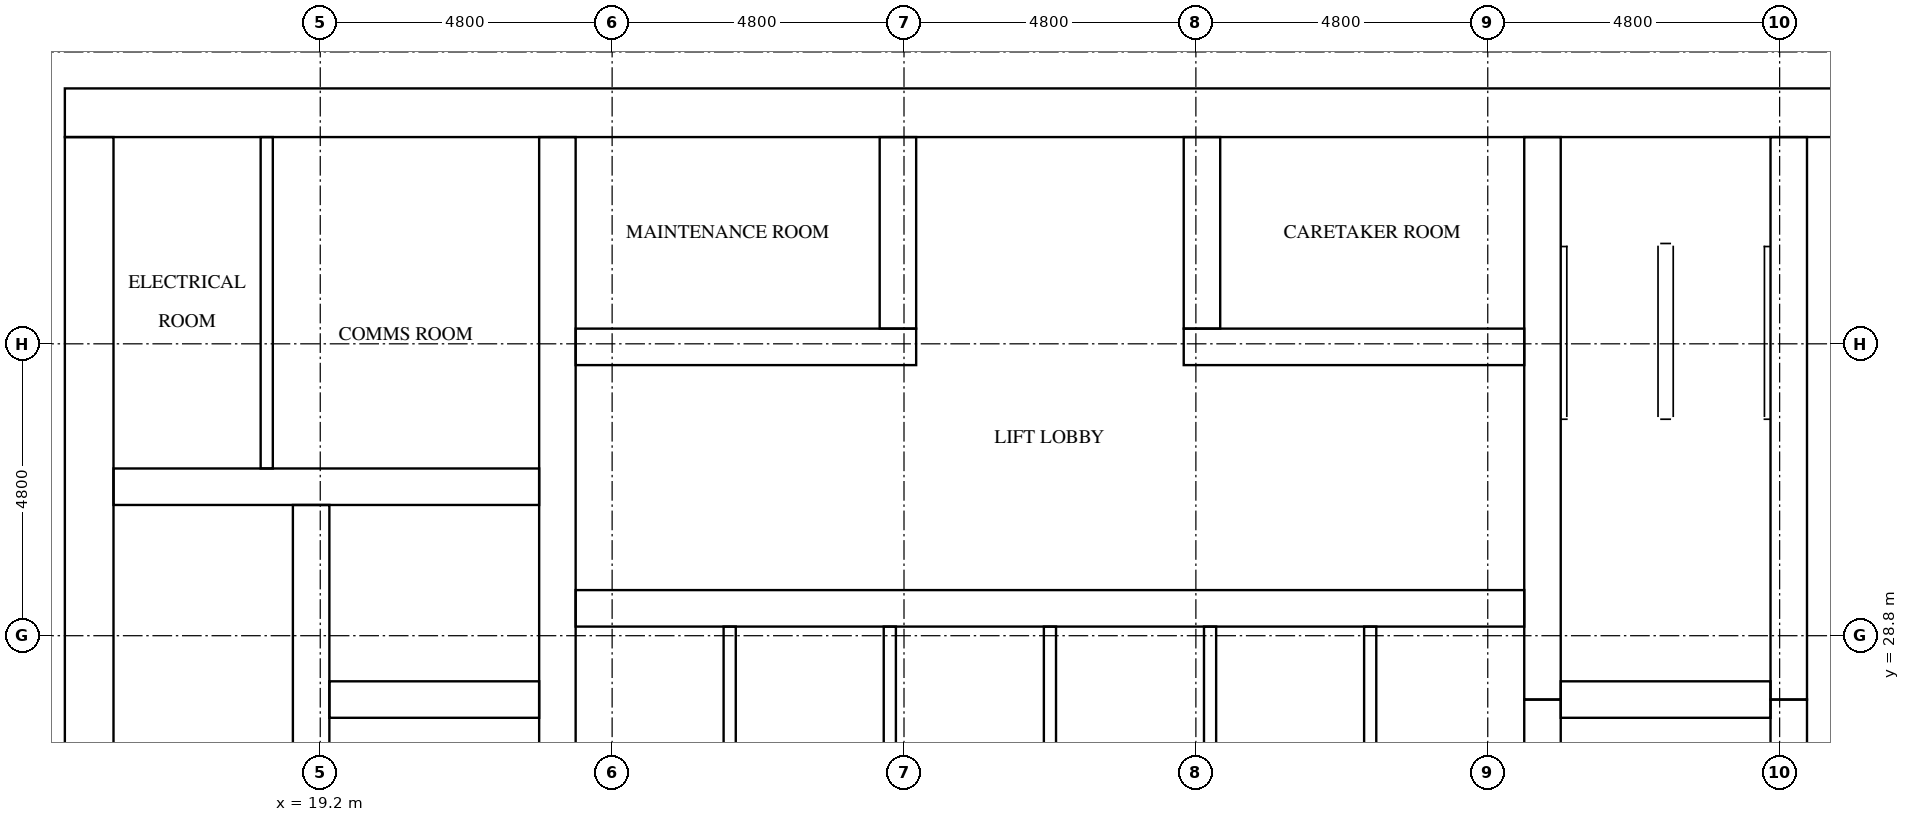
"""IFC4 building model, lengths in metres.
Left out: names, types, materials, properties, quantities, classifications, styles, units other than length and angle.
Written with IfcOpenShell. Run it as: python <this file> out.ifc"""

import sys

from ifc_helpers import new_model, si_unit, direction, frame, frame_2d, origin, place, context, subcontext, project, spatial, rectangle, extrude, element, fill, save


model = new_model("IFC4")
c1 = context("Model", 3, precision=1e-05, world=origin(), true_north=direction((0.0, 1.0)))
c2 = subcontext(c1, "Body", "Model", "MODEL_VIEW")
j1 = project(units=[si_unit("LENGTHUNIT", "METRE"), si_unit("PLANEANGLEUNIT", "RADIAN")], contexts=[c1])
p1 = place(None, origin())
s1 = spatial("IfcSite", under=j1, at=p1, CompositionType="ELEMENT")
p2 = place(p1, origin())
s2 = spatial("IfcBuilding", under=s1, at=p2, CompositionType="ELEMENT")
p3 = place(p2, frame((0.0, 0.0, 152.5)))
s3 = spatial("IfcBuildingStorey", under=s2, at=p3, CompositionType="ELEMENT", Elevation=152.5)
p4 = place(p3, frame((15.0, 37.4, 0.0), z_axis=(0.0, 0.0, 1.0), x_axis=(1.0, 0.0, 0.0)))
e1 = element("IfcWall", 1, at=p4, inside=s3, PredefinedType="SHEAR", context=c2, shape_type="SweptSolid", body=[
    extrude(rectangle(XDim=32.4, YDim=0.8, at=frame_2d((16.2, 0.0))), origin(), (0.0, 0.0, 1.0), 3.2),
])
p5 = place(p4, frame((15.3, 0.0, 0.0)))
e2 = element("IfcOpeningElement", 2, at=p5, cuts=e1, PredefinedType="OPENING", context=c2, shape_type="SweptSolid", body=[
    extrude(rectangle(XDim=1.8, YDim=2.1, at=frame_2d((0.9, 1.05))), frame((0.0, 0.41, 0.0), z_axis=(0.0, -1.0, 0.0), x_axis=(1.0, 0.0, 0.0)), (0.0, 0.0, 1.0), 0.82),
])
p6 = place(p4, frame((1.51, 0.0, 0.0)))
e3 = element("IfcOpeningElement", 3, at=p6, cuts=e1, PredefinedType="OPENING", context=c2, shape_type="SweptSolid", body=[
    extrude(rectangle(XDim=1.0, YDim=2.1, at=frame_2d((0.5, 1.05))), frame((0.0, 0.41, 0.0), z_axis=(0.0, -1.0, 0.0), x_axis=(1.0, 0.0, 0.0)), (0.0, 0.0, 1.0), 0.82),
])
p7 = place(p4, frame((5.11, 0.0, 0.0)))
e4 = element("IfcOpeningElement", 4, at=p7, cuts=e1, PredefinedType="OPENING", context=c2, shape_type="SweptSolid", body=[
    extrude(rectangle(XDim=1.0, YDim=2.1, at=frame_2d((0.5, 1.05))), frame((0.0, 0.41, 0.0), z_axis=(0.0, -1.0, 0.0), x_axis=(1.0, 0.0, 0.0)), (0.0, 0.0, 1.0), 0.82),
])
p8 = place(p3, frame((15.4, 15.8, 0.0), z_axis=(0.0, 0.0, 1.0), x_axis=(0.0, 1.0, 0.0)))
e5 = element("IfcWall", 5, at=p8, inside=s3, PredefinedType="SHEAR", context=c2, shape_type="SweptSolid", body=[
    extrude(rectangle(XDim=21.2, YDim=0.8, at=frame_2d((10.6, 0.0))), origin(), (0.0, 0.0, 1.0), 3.2),
])
p9 = place(p8, frame((4.96, 0.0, 0.0)))
e6 = element("IfcOpeningElement", 6, at=p9, cuts=e5, PredefinedType="OPENING", context=c2, shape_type="SweptSolid", body=[
    extrude(rectangle(XDim=1.2, YDim=2.1, at=frame_2d((0.6, 1.05))), frame((0.0, 0.41, 0.0), z_axis=(0.0, -1.0, 0.0), x_axis=(1.0, 0.0, 0.0)), (0.0, 0.0, 1.0), 0.82),
])
p10 = place(p3, frame((19.05, 15.8, 0.0), z_axis=(0.0, 0.0, 1.0), x_axis=(0.0, 1.0, 0.0)))
e7 = element("IfcWall", 7, at=p10, inside=s3, PredefinedType="SHEAR", context=c2, shape_type="SweptSolid", body=[
    extrude(rectangle(XDim=15.15, YDim=0.6, at=frame_2d((7.575, 0.0))), origin(), (0.0, 0.0, 1.0), 3.2),
])
p11 = place(p10, frame((9.65, 0.0, 0.0)))
e8 = element("IfcOpeningElement", 8, at=p11, cuts=e7, PredefinedType="OPENING", context=c2, shape_type="SweptSolid", body=[
    extrude(rectangle(XDim=1.1, YDim=2.1, at=frame_2d((0.55, 1.05))), frame((0.0, 0.31, 0.0), z_axis=(0.0, -1.0, 0.0), x_axis=(1.0, 0.0, 0.0)), (0.0, 0.0, 1.0), 0.62),
])
p12 = place(p10, frame((13.15, 0.0, 0.0)))
e9 = element("IfcOpeningElement", 9, at=p12, cuts=e7, PredefinedType="OPENING", context=c2, shape_type="SweptSolid", body=[
    extrude(rectangle(XDim=1.1, YDim=2.1, at=frame_2d((0.55, 1.05))), frame((0.0, 0.31, 0.0), z_axis=(0.0, -1.0, 0.0), x_axis=(1.0, 0.0, 0.0)), (0.0, 0.0, 1.0), 0.62),
])
p13 = place(p10, frame((0.4, 0.0, 0.0)))
e10 = element("IfcOpeningElement", 10, at=p13, cuts=e7, PredefinedType="OPENING", context=c2, shape_type="SweptSolid", body=[
    extrude(rectangle(XDim=1.2, YDim=2.1, at=frame_2d((0.6, 1.05))), frame((0.0, 0.31, 0.0), z_axis=(0.0, -1.0, 0.0), x_axis=(1.0, 0.0, 0.0)), (0.0, 0.0, 1.0), 0.62),
])
p14 = place(p3, frame((23.1, 15.8, 0.0), z_axis=(0.0, 0.0, 1.0), x_axis=(0.0, 1.0, 0.0)))
e11 = element("IfcWall", 11, at=p14, inside=s3, PredefinedType="SHEAR", context=c2, shape_type="SweptSolid", body=[
    extrude(rectangle(XDim=21.2, YDim=0.6, at=frame_2d((10.6, 0.0))), origin(), (0.0, 0.0, 1.0), 3.2),
])
p15 = place(p3, frame((39.3, 24.25, 0.0), z_axis=(0.0, 0.0, 1.0), x_axis=(0.0, 1.0, 0.0)))
e12 = element("IfcWall", 12, at=p15, inside=s3, PredefinedType="SHEAR", context=c2, shape_type="SweptSolid", body=[
    extrude(rectangle(XDim=3.5, YDim=0.6, at=frame_2d((1.75, 0.0))), origin(), (0.0, 0.0, 1.0), 3.2),
])
p16 = place(p3, frame((39.3, 27.75, 0.0), z_axis=(0.0, 0.0, 1.0), x_axis=(0.0, 1.0, 0.0)))
e13 = element("IfcWall", 13, at=p16, inside=s3, PredefinedType="SHEAR", context=c2, shape_type="SweptSolid", body=[
    extrude(rectangle(XDim=9.25, YDim=0.6, at=frame_2d((4.625, 0.0))), origin(), (0.0, 0.0, 1.0), 3.2),
])
p17 = place(p3, frame((43.35, 24.25, 0.0), z_axis=(0.0, 0.0, 1.0), x_axis=(0.0, 1.0, 0.0)))
e14 = element("IfcWall", 14, at=p17, inside=s3, PredefinedType="SHEAR", context=c2, shape_type="SweptSolid", body=[
    extrude(rectangle(XDim=3.5, YDim=0.6, at=frame_2d((1.75, 0.0))), origin(), (0.0, 0.0, 1.0), 3.2),
])
p18 = place(p17, frame((1.2, 0.0, 0.0)))
e15 = element("IfcOpeningElement", 15, at=p18, cuts=e14, PredefinedType="OPENING", context=c2, shape_type="SweptSolid", body=[
    extrude(rectangle(XDim=1.1, YDim=2.1, at=frame_2d((0.55, 1.05))), frame((0.0, 0.31, 0.0), z_axis=(0.0, -1.0, 0.0), x_axis=(1.0, 0.0, 0.0)), (0.0, 0.0, 1.0), 0.62),
])
p19 = place(p3, frame((43.35, 27.75, 0.0), z_axis=(0.0, 0.0, 1.0), x_axis=(0.0, 1.0, 0.0)))
e16 = element("IfcWall", 16, at=p19, inside=s3, PredefinedType="SHEAR", context=c2, shape_type="SweptSolid", body=[
    extrude(rectangle(XDim=9.25, YDim=0.6, at=frame_2d((4.625, 0.0))), origin(), (0.0, 0.0, 1.0), 3.2),
])
p20 = place(p19, frame((7.65, 0.0, 0.0)))
e17 = element("IfcOpeningElement", 17, at=p20, cuts=e16, PredefinedType="OPENING", context=c2, shape_type="SweptSolid", body=[
    extrude(rectangle(XDim=1.2, YDim=2.1, at=frame_2d((0.6, 1.05))), frame((0.0, 0.31, 0.0), z_axis=(0.0, -1.0, 0.0), x_axis=(1.0, 0.0, 0.0)), (0.0, 0.0, 1.0), 0.62),
])
p21 = place(p3, frame((19.35, 27.75, 0.0), z_axis=(0.0, 0.0, 1.0), x_axis=(1.0, 0.0, 0.0)))
e18 = element("IfcWall", 18, at=p21, inside=s3, PredefinedType="SHEAR", context=c2, shape_type="SweptSolid", body=[
    extrude(rectangle(XDim=3.45, YDim=0.6, at=frame_2d((1.725, 0.0))), origin(), (0.0, 0.0, 1.0), 3.2),
])
p22 = place(p3, frame((15.8, 31.25, 0.0), z_axis=(0.0, 0.0, 1.0), x_axis=(1.0, 0.0, 0.0)))
e19 = element("IfcWall", 19, at=p22, inside=s3, PredefinedType="SHEAR", context=c2, shape_type="SweptSolid", body=[
    extrude(rectangle(XDim=7.0, YDim=0.6, at=frame_2d((3.5, 0.0))), origin(), (0.0, 0.0, 1.0), 3.2),
])
p23 = place(p3, frame((39.6, 27.75, 0.0), z_axis=(0.0, 0.0, 1.0), x_axis=(1.0, 0.0, 0.0)))
e20 = element("IfcWall", 20, at=p23, inside=s3, PredefinedType="SHEAR", context=c2, shape_type="SweptSolid", body=[
    extrude(rectangle(XDim=3.45, YDim=0.6, at=frame_2d((1.725, 0.0))), origin(), (0.0, 0.0, 1.0), 3.2),
])
p24 = place(p3, frame((23.4, 29.25, 0.0), z_axis=(0.0, 0.0, 1.0), x_axis=(1.0, 0.0, 0.0)))
e21 = element("IfcWall", 21, at=p24, inside=s3, PredefinedType="SHEAR", context=c2, shape_type="SweptSolid", body=[
    extrude(rectangle(XDim=15.6, YDim=0.6, at=frame_2d((7.8, 0.0))), origin(), (0.0, 0.0, 1.0), 3.2),
])
p25 = place(p24, frame((0.667, 0.0, 0.0)))
e22 = element("IfcOpeningElement", 22, at=p25, cuts=e21, PredefinedType="OPENING", context=c2, shape_type="SweptSolid", body=[
    extrude(rectangle(XDim=1.1, YDim=2.1, at=frame_2d((0.55, 1.05))), frame((0.0, 0.31, 0.0), z_axis=(0.0, -1.0, 0.0), x_axis=(1.0, 0.0, 0.0)), (0.0, 0.0, 1.0), 0.62),
])
p26 = place(p24, frame((3.3, 0.0, 0.0)))
e23 = element("IfcOpeningElement", 23, at=p26, cuts=e21, PredefinedType="OPENING", context=c2, shape_type="SweptSolid", body=[
    extrude(rectangle(XDim=1.1, YDim=2.1, at=frame_2d((0.55, 1.05))), frame((0.0, 0.31, 0.0), z_axis=(0.0, -1.0, 0.0), x_axis=(1.0, 0.0, 0.0)), (0.0, 0.0, 1.0), 0.62),
])
p27 = place(p24, frame((5.933, 0.0, 0.0)))
e24 = element("IfcOpeningElement", 24, at=p27, cuts=e21, PredefinedType="OPENING", context=c2, shape_type="SweptSolid", body=[
    extrude(rectangle(XDim=1.1, YDim=2.1, at=frame_2d((0.55, 1.05))), frame((0.0, 0.31, 0.0), z_axis=(0.0, -1.0, 0.0), x_axis=(1.0, 0.0, 0.0)), (0.0, 0.0, 1.0), 0.62),
])
p28 = place(p24, frame((8.567, 0.0, 0.0)))
e25 = element("IfcOpeningElement", 25, at=p28, cuts=e21, PredefinedType="OPENING", context=c2, shape_type="SweptSolid", body=[
    extrude(rectangle(XDim=1.1, YDim=2.1, at=frame_2d((0.55, 1.05))), frame((0.0, 0.31, 0.0), z_axis=(0.0, -1.0, 0.0), x_axis=(1.0, 0.0, 0.0)), (0.0, 0.0, 1.0), 0.62),
])
p29 = place(p24, frame((11.2, 0.0, 0.0)))
e26 = element("IfcOpeningElement", 26, at=p29, cuts=e21, PredefinedType="OPENING", context=c2, shape_type="SweptSolid", body=[
    extrude(rectangle(XDim=1.1, YDim=2.1, at=frame_2d((0.55, 1.05))), frame((0.0, 0.31, 0.0), z_axis=(0.0, -1.0, 0.0), x_axis=(1.0, 0.0, 0.0)), (0.0, 0.0, 1.0), 0.62),
])
p30 = place(p24, frame((13.833, 0.0, 0.0)))
e27 = element("IfcOpeningElement", 27, at=p30, cuts=e21, PredefinedType="OPENING", context=c2, shape_type="SweptSolid", body=[
    extrude(rectangle(XDim=1.1, YDim=2.1, at=frame_2d((0.55, 1.05))), frame((0.0, 0.31, 0.0), z_axis=(0.0, -1.0, 0.0), x_axis=(1.0, 0.0, 0.0)), (0.0, 0.0, 1.0), 0.62),
])
p31 = place(p3, frame((23.4, 33.55, 0.0), z_axis=(0.0, 0.0, 1.0), x_axis=(1.0, 0.0, 0.0)))
e28 = element("IfcWall", 28, at=p31, inside=s3, PredefinedType="SHEAR", context=c2, shape_type="SweptSolid", body=[
    extrude(rectangle(XDim=5.6, YDim=0.6, at=frame_2d((2.8, 0.0))), origin(), (0.0, 0.0, 1.0), 3.2),
])
p32 = place(p31, frame((2.0, 0.0, 0.0)))
e29 = element("IfcOpeningElement", 29, at=p32, cuts=e28, PredefinedType="OPENING", context=c2, shape_type="SweptSolid", body=[
    extrude(rectangle(XDim=1.0, YDim=2.1, at=frame_2d((0.5, 1.05))), frame((0.0, 0.31, 0.0), z_axis=(0.0, -1.0, 0.0), x_axis=(1.0, 0.0, 0.0)), (0.0, 0.0, 1.0), 0.62),
])
p33 = place(p3, frame((33.4, 33.55, 0.0), z_axis=(0.0, 0.0, 1.0), x_axis=(1.0, 0.0, 0.0)))
e30 = element("IfcWall", 30, at=p33, inside=s3, PredefinedType="SHEAR", context=c2, shape_type="SweptSolid", body=[
    extrude(rectangle(XDim=5.6, YDim=0.6, at=frame_2d((2.8, 0.0))), origin(), (0.0, 0.0, 1.0), 3.2),
])
p34 = place(p33, frame((2.6, 0.0, 0.0)))
e31 = element("IfcOpeningElement", 31, at=p34, cuts=e30, PredefinedType="OPENING", context=c2, shape_type="SweptSolid", body=[
    extrude(rectangle(XDim=1.0, YDim=2.1, at=frame_2d((0.5, 1.05))), frame((0.0, 0.31, 0.0), z_axis=(0.0, -1.0, 0.0), x_axis=(1.0, 0.0, 0.0)), (0.0, 0.0, 1.0), 0.62),
])
for number, where, z_axis, x_axis in (
    (32, (28.7, 33.85, 0.0), (0.0, 0.0, 1.0), (0.0, 1.0, 0.0)),
    (33, (33.7, 33.85, 0.0), (0.0, 0.0, 1.0), (0.0, 1.0, 0.0)),
):
    element("IfcWall", number, at=place(p3, frame(where, z_axis=z_axis, x_axis=x_axis)), inside=s3, PredefinedType="SHEAR", context=c2, shape_type="SweptSolid", body=[
        extrude(rectangle(XDim=3.15, YDim=0.6, at=frame_2d((1.575, 0.0))), origin(), (0.0, 0.0, 1.0), 3.2),
    ])
for number, where, z_axis, x_axis in (
    (34, (25.933, 26.45, 0.0), (0.0, 0.0, 1.0), (0.0, 1.0, 0.0)),
    (35, (28.567, 26.45, 0.0), (0.0, 0.0, 1.0), (0.0, 1.0, 0.0)),
    (36, (31.2, 26.45, 0.0), (0.0, 0.0, 1.0), (0.0, 1.0, 0.0)),
    (37, (33.833, 26.45, 0.0), (0.0, 0.0, 1.0), (0.0, 1.0, 0.0)),
    (38, (36.467, 26.45, 0.0), (0.0, 0.0, 1.0), (0.0, 1.0, 0.0)),
):
    element("IfcWall", number, at=place(p3, frame(where, z_axis=z_axis, x_axis=x_axis)), inside=s3, PredefinedType="SOLIDWALL", context=c2, shape_type="SweptSolid", body=[
        extrude(rectangle(XDim=2.5, YDim=0.2, at=frame_2d((1.25, 0.0))), origin(), (0.0, 0.0, 1.0), 3.2),
    ])
p35 = place(p3, frame((18.32, 31.55, 0.0), z_axis=(0.0, 0.0, 1.0), x_axis=(0.0, 1.0, 0.0)))
e39 = element("IfcWall", 39, at=p35, inside=s3, PredefinedType="PARTITIONING", context=c2, shape_type="SweptSolid", body=[
    extrude(rectangle(XDim=5.45, YDim=0.2, at=frame_2d((2.725, 0.0))), origin(), (0.0, 0.0, 1.0), 3.2),
])
p36 = place(p25, origin())
e40 = element("IfcDoor", 40, at=p36, inside=s3, OperationType="DOUBLE_DOOR_SLIDING", PredefinedType="DOOR", context=c2, shape_type="SweptSolid", body=[
    extrude(rectangle(XDim=1.1, YDim=2.1, at=frame_2d((0.55, 1.05))), frame((0.0, 0.025, 0.0), z_axis=(0.0, -1.0, 0.0), x_axis=(1.0, 0.0, 0.0)), (0.0, 0.0, 1.0), 0.05),
])
fill(e22, e40)
p37 = place(p26, origin())
e41 = element("IfcDoor", 41, at=p37, inside=s3, OperationType="DOUBLE_DOOR_SLIDING", PredefinedType="DOOR", context=c2, shape_type="SweptSolid", body=[
    extrude(rectangle(XDim=1.1, YDim=2.1, at=frame_2d((0.55, 1.05))), frame((0.0, 0.025, 0.0), z_axis=(0.0, -1.0, 0.0), x_axis=(1.0, 0.0, 0.0)), (0.0, 0.0, 1.0), 0.05),
])
fill(e23, e41)
p38 = place(p27, origin())
e42 = element("IfcDoor", 42, at=p38, inside=s3, OperationType="DOUBLE_DOOR_SLIDING", PredefinedType="DOOR", context=c2, shape_type="SweptSolid", body=[
    extrude(rectangle(XDim=1.1, YDim=2.1, at=frame_2d((0.55, 1.05))), frame((0.0, 0.025, 0.0), z_axis=(0.0, -1.0, 0.0), x_axis=(1.0, 0.0, 0.0)), (0.0, 0.0, 1.0), 0.05),
])
fill(e24, e42)
p39 = place(p28, origin())
e43 = element("IfcDoor", 43, at=p39, inside=s3, OperationType="DOUBLE_DOOR_SLIDING", PredefinedType="DOOR", context=c2, shape_type="SweptSolid", body=[
    extrude(rectangle(XDim=1.1, YDim=2.1, at=frame_2d((0.55, 1.05))), frame((0.0, 0.025, 0.0), z_axis=(0.0, -1.0, 0.0), x_axis=(1.0, 0.0, 0.0)), (0.0, 0.0, 1.0), 0.05),
])
fill(e25, e43)
p40 = place(p29, origin())
e44 = element("IfcDoor", 44, at=p40, inside=s3, OperationType="DOUBLE_DOOR_SLIDING", PredefinedType="DOOR", context=c2, shape_type="SweptSolid", body=[
    extrude(rectangle(XDim=1.1, YDim=2.1, at=frame_2d((0.55, 1.05))), frame((0.0, 0.025, 0.0), z_axis=(0.0, -1.0, 0.0), x_axis=(1.0, 0.0, 0.0)), (0.0, 0.0, 1.0), 0.05),
])
fill(e26, e44)
p41 = place(p30, origin())
e45 = element("IfcDoor", 45, at=p41, inside=s3, OperationType="DOUBLE_DOOR_SLIDING", PredefinedType="DOOR", context=c2, shape_type="SweptSolid", body=[
    extrude(rectangle(XDim=1.1, YDim=2.1, at=frame_2d((0.55, 1.05))), frame((0.0, 0.025, 0.0), z_axis=(0.0, -1.0, 0.0), x_axis=(1.0, 0.0, 0.0)), (0.0, 0.0, 1.0), 0.05),
])
fill(e27, e45)
p42 = place(p12, origin())
e46 = element("IfcDoor", 46, at=p42, inside=s3, OperationType="DOUBLE_DOOR_SLIDING", PredefinedType="DOOR", context=c2, shape_type="SweptSolid", body=[
    extrude(rectangle(XDim=1.1, YDim=2.1, at=frame_2d((0.55, 1.05))), frame((0.0, 0.025, 0.0), z_axis=(0.0, -1.0, 0.0), x_axis=(1.0, 0.0, 0.0)), (0.0, 0.0, 1.0), 0.05),
])
fill(e9, e46)
p43 = place(p20, origin())
e47 = element("IfcDoor", 47, at=p43, inside=s3, OperationType="SINGLE_SWING_LEFT", PredefinedType="DOOR", context=c2, shape_type="SweptSolid", body=[
    extrude(rectangle(XDim=1.2, YDim=2.1, at=frame_2d((0.6, 1.05))), frame((0.0, 0.025, 0.0), z_axis=(0.0, -1.0, 0.0), x_axis=(1.0, 0.0, 0.0)), (0.0, 0.0, 1.0), 0.05),
])
fill(e17, e47)
p44 = place(p5, origin())
e48 = element("IfcDoor", 48, at=p44, inside=s3, OperationType="DOUBLE_DOOR_SINGLE_SWING", PredefinedType="DOOR", context=c2, shape_type="SweptSolid", body=[
    extrude(rectangle(XDim=1.8, YDim=2.1, at=frame_2d((0.9, 1.05))), frame((0.0, 0.025, 0.0), z_axis=(0.0, -1.0, 0.0), x_axis=(1.0, 0.0, 0.0)), (0.0, 0.0, 1.0), 0.05),
])
fill(e2, e48)
p45 = place(p6, origin())
e49 = element("IfcDoor", 49, at=p45, inside=s3, OperationType="SINGLE_SWING_RIGHT", PredefinedType="DOOR", context=c2, shape_type="SweptSolid", body=[
    extrude(rectangle(XDim=1.0, YDim=2.1, at=frame_2d((0.5, 1.05))), frame((0.0, 0.025, 0.0), z_axis=(0.0, -1.0, 0.0), x_axis=(1.0, 0.0, 0.0)), (0.0, 0.0, 1.0), 0.05),
])
fill(e3, e49)
p46 = place(p7, origin())
e50 = element("IfcDoor", 50, at=p46, inside=s3, OperationType="SINGLE_SWING_LEFT", PredefinedType="DOOR", context=c2, shape_type="SweptSolid", body=[
    extrude(rectangle(XDim=1.0, YDim=2.1, at=frame_2d((0.5, 1.05))), frame((0.0, 0.025, 0.0), z_axis=(0.0, -1.0, 0.0), x_axis=(1.0, 0.0, 0.0)), (0.0, 0.0, 1.0), 0.05),
])
fill(e4, e50)
p47 = place(p32, frame((1.0, 0.0, 0.0), z_axis=(0.0, 0.0, 1.0), x_axis=(-1.0, 0.0, 0.0)))
e51 = element("IfcDoor", 51, at=p47, inside=s3, OperationType="SINGLE_SWING_RIGHT", PredefinedType="DOOR", context=c2, shape_type="SweptSolid", body=[
    extrude(rectangle(XDim=1.0, YDim=2.1, at=frame_2d((0.5, 1.05))), frame((0.0, 0.025, 0.0), z_axis=(0.0, -1.0, 0.0), x_axis=(1.0, 0.0, 0.0)), (0.0, 0.0, 1.0), 0.05),
])
fill(e29, e51)
p48 = place(p34, frame((1.0, 0.0, 0.0), z_axis=(0.0, 0.0, 1.0), x_axis=(-1.0, 0.0, 0.0)))
e52 = element("IfcDoor", 52, at=p48, inside=s3, OperationType="SINGLE_SWING_LEFT", PredefinedType="DOOR", context=c2, shape_type="SweptSolid", body=[
    extrude(rectangle(XDim=1.0, YDim=2.1, at=frame_2d((0.5, 1.05))), frame((0.0, 0.025, 0.0), z_axis=(0.0, -1.0, 0.0), x_axis=(1.0, 0.0, 0.0)), (0.0, 0.0, 1.0), 0.05),
])
fill(e31, e52)
save(model, sys.argv[1])
